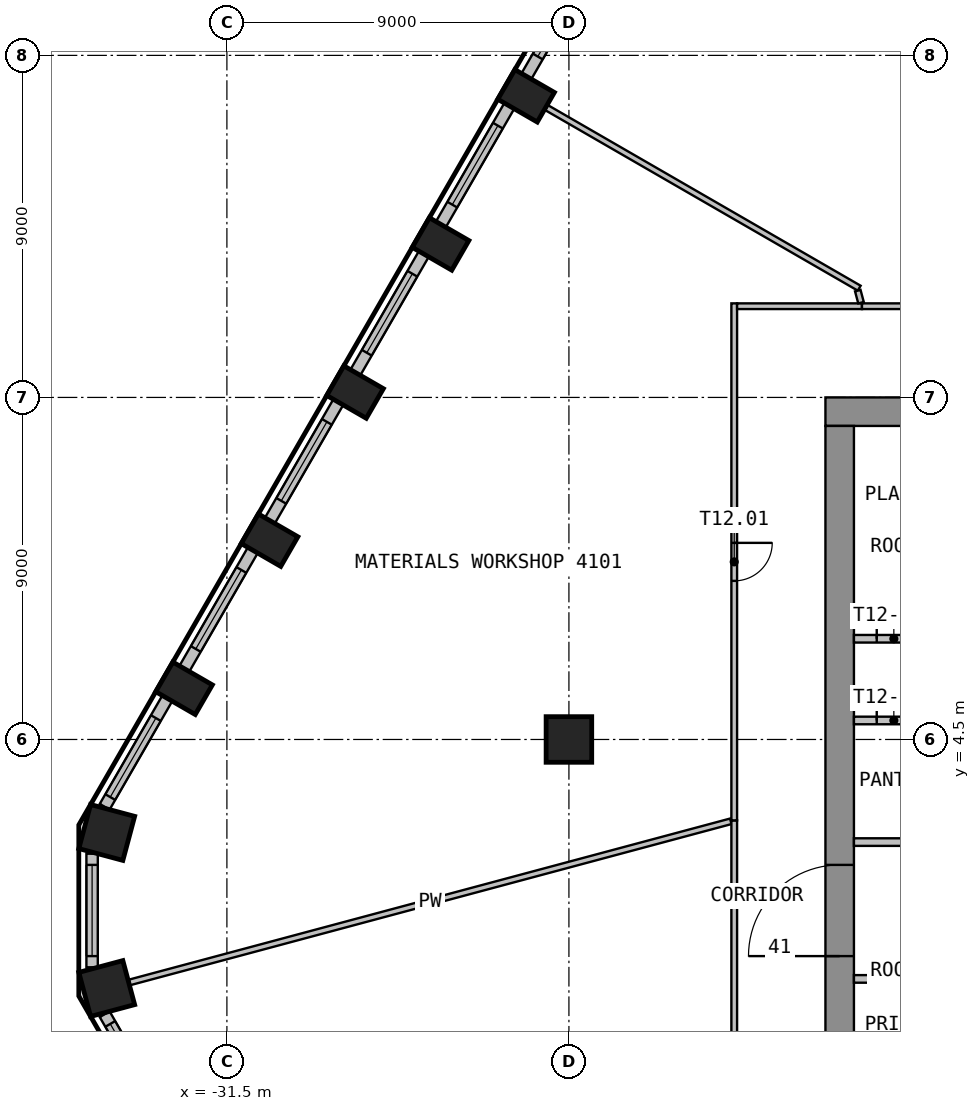
"""IFC4 building model, lengths in metres.
Left out: names, types, materials, properties, quantities, classifications, styles, units other than length and angle.
Written with IfcOpenShell. Run it as: python <this file> out.ifc"""

import sys

from ifc_helpers import new_model, si_unit, direction, frame, frame_2d, origin, origin_2d, place, context, subcontext, project, spatial, rectangle, circle, extrude, element, fill, save


model = new_model("IFC4")
c1 = context("Model", 3, precision=1e-05, world=origin(), true_north=direction((0.0, 1.0)))
c2 = subcontext(c1, "Body", "Model", "MODEL_VIEW")
j1 = project(units=[si_unit("LENGTHUNIT", "METRE"), si_unit("PLANEANGLEUNIT", "RADIAN")], contexts=[c1])
p1 = place(None, origin())
s1 = spatial("IfcSite", under=j1, at=p1, CompositionType="ELEMENT")
p2 = place(p1, origin())
s2 = spatial("IfcBuilding", under=s1, at=p2, CompositionType="ELEMENT")
p3 = place(p2, frame((0.0, 0.0, 167.7)))
s3 = spatial("IfcBuildingStorey", under=s2, at=p3, CompositionType="ELEMENT", Elevation=167.7)
for number, where, z_axis, x_axis in (
    (1, (-23.627, 21.436, 0.0), (0.0, 0.0, 1.0), (-0.5, -0.866, 0.0)),
    (2, (-25.877, 17.539, 0.0), (0.0, 0.0, 1.0), (-0.5, -0.866, 0.0)),
    (3, (-28.127, 13.641, 0.0), (0.0, 0.0, 1.0), (-0.5, -0.866, 0.0)),
    (4, (-30.377, 9.744, 0.0), (0.0, 0.0, 1.0), (-0.5, -0.866, 0.0)),
    (5, (-32.627, 5.847, 0.0), (0.0, 0.0, 1.0), (-0.5, -0.866, 0.0)),
):
    element("IfcColumn", number, at=place(p3, frame(where, z_axis=z_axis, x_axis=x_axis)), inside=s3, PredefinedType="COLUMN", context=c2, shape_type="SweptSolid", body=[
        extrude(rectangle(XDim=0.9, YDim=1.2, at=origin_2d()), origin(), (0.0, 0.0, 1.0), 3.575),
    ])
for number, where, z_axis, x_axis in (
    (6, (-34.662, 2.053, 0.0), (0.0, 0.0, 1.0), (-0.259, -0.966, 0.0)),
    (7, (-34.662, -2.053, 0.0), (0.0, 0.0, 1.0), (0.259, -0.966, 0.0)),
):
    element("IfcColumn", number, at=place(p3, frame(where, z_axis=z_axis, x_axis=x_axis)), inside=s3, PredefinedType="COLUMN", context=c2, shape_type="SweptSolid", body=[
        extrude(rectangle(XDim=1.2, YDim=1.2, at=origin_2d()), origin(), (0.0, 0.0, 1.0), 3.575),
    ])
p4 = place(p3, frame((-22.5, 4.5, 0.0), z_axis=(0.0, 0.0, 1.0), x_axis=(1.0, 0.0, 0.0)))
e8 = element("IfcColumn", 8, at=p4, inside=s3, PredefinedType="COLUMN", context=c2, shape_type="SweptSolid", body=[
    extrude(circle(Radius=0.6, at=origin_2d()), origin(), (0.0, 0.0, 1.0), 3.575),
])
p5 = place(p3, frame((-21.972, 24.803, 0.0), z_axis=(0.0, 0.0, 1.0), x_axis=(-0.500036802197, -0.866004154983, 0.0)))
e9 = element("IfcWall", 9, at=p5, inside=s3, PredefinedType="SOLIDWALL", context=c2, shape_type="SweptSolid", body=[
    extrude(rectangle(XDim=3.294, YDim=0.3, at=frame_2d((1.647, 0.0))), origin(), (0.0, 0.0, 1.0), 3.575),
])
p6 = place(p5, frame((0.294, 0.0, 0.9)))
e10 = element("IfcOpeningElement", 10, at=p6, cuts=e9, PredefinedType="OPENING", context=c2, shape_type="SweptSolid", body=[
    extrude(rectangle(XDim=2.4, YDim=2.1, at=frame_2d((1.2, 1.05))), frame((0.0, 0.16, 0.0), z_axis=(0.0, -1.0, 0.0), x_axis=(1.0, 0.0, 0.0)), (0.0, 0.0, 1.0), 0.32),
])
p7 = place(p3, frame((-24.069, 21.17, 0.0), z_axis=(0.0, 0.0, 1.0), x_axis=(-0.500027802648, -0.866009351323, 0.0)))
e11 = element("IfcWall", 11, at=p7, inside=s3, PredefinedType="SOLIDWALL", context=c2, shape_type="SweptSolid", body=[
    extrude(rectangle(XDim=3.599, YDim=0.3, at=frame_2d((1.799, 0.0))), origin(), (0.0, 0.0, 1.0), 3.575),
])
p8 = place(p7, frame((0.6, 0.0, 0.9)))
e12 = element("IfcOpeningElement", 12, at=p8, cuts=e11, PredefinedType="OPENING", context=c2, shape_type="SweptSolid", body=[
    extrude(rectangle(XDim=2.4, YDim=2.1, at=frame_2d((1.2, 1.05))), frame((0.0, 0.16, 0.0), z_axis=(0.0, -1.0, 0.0), x_axis=(1.0, 0.0, 0.0)), (0.0, 0.0, 1.0), 0.32),
])
p9 = place(p3, frame((-26.319, 17.273, 0.0), z_axis=(0.0, 0.0, 1.0), x_axis=(-0.500027802648, -0.866009351323, 0.0)))
e13 = element("IfcWall", 13, at=p9, inside=s3, PredefinedType="SOLIDWALL", context=c2, shape_type="SweptSolid", body=[
    extrude(rectangle(XDim=3.599, YDim=0.3, at=frame_2d((1.799, 0.0))), origin(), (0.0, 0.0, 1.0), 3.575),
])
p10 = place(p9, frame((0.6, 0.0, 0.9)))
e14 = element("IfcOpeningElement", 14, at=p10, cuts=e13, PredefinedType="OPENING", context=c2, shape_type="SweptSolid", body=[
    extrude(rectangle(XDim=2.4, YDim=2.1, at=frame_2d((1.2, 1.05))), frame((0.0, 0.16, 0.0), z_axis=(0.0, -1.0, 0.0), x_axis=(1.0, 0.0, 0.0)), (0.0, 0.0, 1.0), 0.32),
])
p11 = place(p3, frame((-28.569, 13.376, 0.0), z_axis=(0.0, 0.0, 1.0), x_axis=(-0.500027802648, -0.866009351323, 0.0)))
e15 = element("IfcWall", 15, at=p11, inside=s3, PredefinedType="SOLIDWALL", context=c2, shape_type="SweptSolid", body=[
    extrude(rectangle(XDim=3.599, YDim=0.3, at=frame_2d((1.799, 0.0))), origin(), (0.0, 0.0, 1.0), 3.575),
])
p12 = place(p11, frame((0.6, 0.0, 0.9)))
e16 = element("IfcOpeningElement", 16, at=p12, cuts=e15, PredefinedType="OPENING", context=c2, shape_type="SweptSolid", body=[
    extrude(rectangle(XDim=2.4, YDim=2.1, at=frame_2d((1.2, 1.05))), frame((0.0, 0.16, 0.0), z_axis=(0.0, -1.0, 0.0), x_axis=(1.0, 0.0, 0.0)), (0.0, 0.0, 1.0), 0.32),
])
p13 = place(p3, frame((-30.819, 9.479, 0.0), z_axis=(0.0, 0.0, 1.0), x_axis=(-0.500027802648, -0.866009351323, 0.0)))
e17 = element("IfcWall", 17, at=p13, inside=s3, PredefinedType="SOLIDWALL", context=c2, shape_type="SweptSolid", body=[
    extrude(rectangle(XDim=3.599, YDim=0.3, at=frame_2d((1.799, 0.0))), origin(), (0.0, 0.0, 1.0), 3.575),
])
p14 = place(p13, frame((0.6, 0.0, 0.9)))
e18 = element("IfcOpeningElement", 18, at=p14, cuts=e17, PredefinedType="OPENING", context=c2, shape_type="SweptSolid", body=[
    extrude(rectangle(XDim=2.4, YDim=2.1, at=frame_2d((1.2, 1.05))), frame((0.0, 0.16, 0.0), z_axis=(0.0, -1.0, 0.0), x_axis=(1.0, 0.0, 0.0)), (0.0, 0.0, 1.0), 0.32),
])
p15 = place(p3, frame((-33.069, 5.582, 0.0), z_axis=(0.0, 0.0, 1.0), x_axis=(-0.499981217486, -0.866036247602, 0.0)))
e19 = element("IfcWall", 19, at=p15, inside=s3, PredefinedType="SOLIDWALL", context=c2, shape_type="SweptSolid", body=[
    extrude(rectangle(XDim=3.294, YDim=0.3, at=frame_2d((1.647, 0.0))), origin(), (0.0, 0.0, 1.0), 3.575),
])
p16 = place(p15, frame((0.6, 0.0, 0.9)))
e20 = element("IfcOpeningElement", 20, at=p16, cuts=e19, PredefinedType="OPENING", context=c2, shape_type="SweptSolid", body=[
    extrude(rectangle(XDim=2.4, YDim=2.1, at=frame_2d((1.2, 1.05))), frame((0.0, 0.16, 0.0), z_axis=(0.0, -1.0, 0.0), x_axis=(1.0, 0.0, 0.0)), (0.0, 0.0, 1.0), 0.32),
])
p17 = place(p3, frame((-35.047, 1.495, 0.0), z_axis=(0.0, 0.0, 1.0), x_axis=(0.0, -1.0, 0.0)))
e21 = element("IfcWall", 21, at=p17, inside=s3, PredefinedType="SOLIDWALL", context=c2, shape_type="SweptSolid", body=[
    extrude(rectangle(XDim=2.989, YDim=0.3, at=frame_2d((1.495, 0.0))), origin(), (0.0, 0.0, 1.0), 3.575),
])
p18 = place(p17, frame((0.295, 0.0, 0.9)))
e22 = element("IfcOpeningElement", 22, at=p18, cuts=e21, PredefinedType="OPENING", context=c2, shape_type="SweptSolid", body=[
    extrude(rectangle(XDim=2.4, YDim=2.1, at=frame_2d((1.2, 1.05))), frame((0.0, 0.16, 0.0), z_axis=(0.0, -1.0, 0.0), x_axis=(1.0, 0.0, 0.0)), (0.0, 0.0, 1.0), 0.32),
])
p19 = place(p3, frame((-34.716, -2.729, 0.0), z_axis=(0.0, 0.0, 1.0), x_axis=(0.499981217486, -0.866036247602, 0.0)))
e23 = element("IfcWall", 23, at=p19, inside=s3, PredefinedType="SOLIDWALL", context=c2, shape_type="SweptSolid", body=[
    extrude(rectangle(XDim=3.294, YDim=0.3, at=frame_2d((1.647, 0.0))), origin(), (0.0, 0.0, 1.0), 3.575),
])
p20 = place(p19, frame((0.295, 0.0, 0.9)))
e24 = element("IfcOpeningElement", 24, at=p20, cuts=e23, PredefinedType="OPENING", context=c2, shape_type="SweptSolid", body=[
    extrude(rectangle(XDim=2.4, YDim=2.1, at=frame_2d((1.2, 1.05))), frame((0.0, 0.16, 0.0), z_axis=(0.0, -1.0, 0.0), x_axis=(1.0, 0.0, 0.0)), (0.0, 0.0, 1.0), 0.32),
])
p21 = place(p3, frame((-15.75, 13.125, 0.0), z_axis=(0.0, 0.0, 1.0), x_axis=(1.0, 0.0, 0.0)))
e25 = element("IfcWall", 25, at=p21, inside=s3, PredefinedType="SHEAR", context=c2, shape_type="SweptSolid", body=[
    extrude(rectangle(XDim=31.5, YDim=0.75, at=frame_2d((15.75, 0.0))), origin(), (0.0, 0.0, 1.0), 3.575),
])
p22 = place(p21, frame((14.55, 0.0, 0.0)))
e26 = element("IfcOpeningElement", 26, at=p22, cuts=e25, PredefinedType="OPENING", context=c2, shape_type="SweptSolid", body=[
    extrude(rectangle(XDim=2.4, YDim=2.1, at=frame_2d((1.2, 1.05))), frame((0.0, 0.385, 0.0), z_axis=(0.0, -1.0, 0.0), x_axis=(1.0, 0.0, 0.0)), (0.0, 0.0, 1.0), 0.77),
])
p23 = place(p21, frame((3.3, 0.0, 0.0)))
e27 = element("IfcOpeningElement", 27, at=p23, cuts=e25, PredefinedType="OPENING", context=c2, shape_type="SweptSolid", body=[
    extrude(rectangle(XDim=1.2, YDim=2.1, at=frame_2d((0.6, 1.05))), frame((0.0, 0.385, 0.0), z_axis=(0.0, -1.0, 0.0), x_axis=(1.0, 0.0, 0.0)), (0.0, 0.0, 1.0), 0.77),
])
p24 = place(p21, frame((27.0, 0.0, 0.0)))
e28 = element("IfcOpeningElement", 28, at=p24, cuts=e25, PredefinedType="OPENING", context=c2, shape_type="SweptSolid", body=[
    extrude(rectangle(XDim=1.2, YDim=2.1, at=frame_2d((0.6, 1.05))), frame((0.0, 0.385, 0.0), z_axis=(0.0, -1.0, 0.0), x_axis=(1.0, 0.0, 0.0)), (0.0, 0.0, 1.0), 0.77),
])
p25 = place(p3, frame((-15.375, -12.75, 0.0), z_axis=(0.0, 0.0, 1.0), x_axis=(0.0, 1.0, 0.0)))
e29 = element("IfcWall", 29, at=p25, inside=s3, PredefinedType="SHEAR", context=c2, shape_type="SweptSolid", body=[
    extrude(rectangle(XDim=25.5, YDim=0.75, at=frame_2d((12.75, 0.0))), origin(), (0.0, 0.0, 1.0), 3.575),
])
p26 = place(p25, frame((11.55, 0.0, 0.0)))
e30 = element("IfcOpeningElement", 30, at=p26, cuts=e29, PredefinedType="OPENING", context=c2, shape_type="SweptSolid", body=[
    extrude(rectangle(XDim=2.4, YDim=2.1, at=frame_2d((1.2, 1.05))), frame((0.0, 0.385, 0.0), z_axis=(0.0, -1.0, 0.0), x_axis=(1.0, 0.0, 0.0)), (0.0, 0.0, 1.0), 0.77),
])
p27 = place(p3, frame((-15.0, 7.15, 0.0), z_axis=(0.0, 0.0, 1.0), x_axis=(1.0, 0.0, 0.0)))
e31 = element("IfcWall", 31, at=p27, inside=s3, PredefinedType="PARTITIONING", context=c2, shape_type="SweptSolid", body=[
    extrude(rectangle(XDim=2.1, YDim=0.2, at=frame_2d((1.05, 0.0))), origin(), (0.0, 0.0, 1.0), 3.575),
])
p28 = place(p27, frame((0.6, 0.0, 0.0)))
e32 = element("IfcOpeningElement", 32, at=p28, cuts=e31, PredefinedType="OPENING", context=c2, shape_type="SweptSolid", body=[
    extrude(rectangle(XDim=0.9, YDim=2.1, at=frame_2d((0.45, 1.05))), frame((0.0, 0.11, 0.0), z_axis=(0.0, -1.0, 0.0), x_axis=(1.0, 0.0, 0.0)), (0.0, 0.0, 1.0), 0.22),
])
p29 = place(p3, frame((-15.0, 5.0, 0.0), z_axis=(0.0, 0.0, 1.0), x_axis=(1.0, 0.0, 0.0)))
e33 = element("IfcWall", 33, at=p29, inside=s3, PredefinedType="PARTITIONING", context=c2, shape_type="SweptSolid", body=[
    extrude(rectangle(XDim=2.1, YDim=0.2, at=frame_2d((1.05, 0.0))), origin(), (0.0, 0.0, 1.0), 3.575),
])
p30 = place(p29, frame((0.6, 0.0, 0.0)))
e34 = element("IfcOpeningElement", 34, at=p30, cuts=e33, PredefinedType="OPENING", context=c2, shape_type="SweptSolid", body=[
    extrude(rectangle(XDim=0.9, YDim=2.1, at=frame_2d((0.45, 1.05))), frame((0.0, 0.11, 0.0), z_axis=(0.0, -1.0, 0.0), x_axis=(1.0, 0.0, 0.0)), (0.0, 0.0, 1.0), 0.22),
])
for number, where, z_axis, x_axis in (
    (35, (-15.0, 1.8, 0.0), (0.0, 0.0, 1.0), (1.0, 0.0, 0.0)),
    (36, (-15.0, -1.8, 0.0), (0.0, 0.0, 1.0), (1.0, 0.0, 0.0)),
):
    element("IfcWall", number, at=place(p3, frame(where, z_axis=z_axis, x_axis=x_axis)), inside=s3, PredefinedType="PARTITIONING", context=c2, shape_type="SweptSolid", body=[
        extrude(rectangle(XDim=2.1, YDim=0.2, at=frame_2d((1.05, 0.0))), origin(), (0.0, 0.0, 1.0), 3.575),
    ])
p31 = place(p3, frame((-18.242, 2.346, 0.0), z_axis=(0.0, 0.0, 1.0), x_axis=(-0.965923767179, -0.258826729682, 0.0)))
e37 = element("IfcWall", 37, at=p31, inside=s3, PredefinedType="PARTITIONING", context=c2, shape_type="SweptSolid", body=[
    extrude(rectangle(XDim=16.38, YDim=0.15, at=frame_2d((8.19, 0.0))), origin(), (0.0, 0.0, 1.0), 3.575),
])
p32 = place(p3, frame((-23.09, 21.126, 0.0), z_axis=(0.0, 0.0, 1.0), x_axis=(0.866011447264, -0.500024172624, 0.0)))
e38 = element("IfcWall", 38, at=p32, inside=s3, PredefinedType="PARTITIONING", context=c2, shape_type="SweptSolid", body=[
    extrude(rectangle(XDim=9.502, YDim=0.15, at=frame_2d((4.751, 0.0))), origin(), (0.0, 0.0, 1.0), 3.575),
])
p33 = place(p3, frame((-18.15, 2.371, 0.0), z_axis=(0.0, 0.0, 1.0), x_axis=(0.0, -1.0, 0.0)))
e39 = element("IfcWall", 39, at=p33, inside=s3, PredefinedType="PARTITIONING", context=c2, shape_type="SweptSolid", body=[
    extrude(rectangle(XDim=18.346, YDim=0.15, at=frame_2d((9.173, 0.0))), origin(), (0.0, 0.0, 1.0), 3.575),
])
p34 = place(p33, frame((8.673, 0.0, 0.0)))
e40 = element("IfcOpeningElement", 40, at=p34, cuts=e39, PredefinedType="OPENING", context=c2, shape_type="SweptSolid", body=[
    extrude(rectangle(XDim=1.0, YDim=2.1, at=frame_2d((0.5, 1.05))), frame((0.0, 0.085, 0.0), z_axis=(0.0, -1.0, 0.0), x_axis=(1.0, 0.0, 0.0)), (0.0, 0.0, 1.0), 0.17),
])
p35 = place(p3, frame((-18.15, 15.975, 0.0), z_axis=(0.0, 0.0, 1.0), x_axis=(0.0, -1.0, 0.0)))
e41 = element("IfcWall", 41, at=p35, inside=s3, PredefinedType="PARTITIONING", context=c2, shape_type="SweptSolid", body=[
    extrude(rectangle(XDim=13.604, YDim=0.15, at=frame_2d((6.802, 0.0))), origin(), (0.0, 0.0, 1.0), 3.575),
])
p36 = place(p35, frame((6.302, 0.0, 0.0)))
e42 = element("IfcOpeningElement", 42, at=p36, cuts=e41, PredefinedType="OPENING", context=c2, shape_type="SweptSolid", body=[
    extrude(rectangle(XDim=1.0, YDim=2.1, at=frame_2d((0.5, 1.05))), frame((0.0, 0.085, 0.0), z_axis=(0.0, -1.0, 0.0), x_axis=(1.0, 0.0, 0.0)), (0.0, 0.0, 1.0), 0.17),
])
p37 = place(p3, frame((-14.789, 15.9, 0.0), z_axis=(0.0, 0.0, 1.0), x_axis=(-1.0, 0.0, 0.0)))
e43 = element("IfcWall", 43, at=p37, inside=s3, PredefinedType="PARTITIONING", context=c2, shape_type="SweptSolid", body=[
    extrude(rectangle(XDim=3.286, YDim=0.15, at=frame_2d((1.643, 0.0))), origin(), (0.0, 0.0, 1.0), 3.575),
])
p38 = place(p3, frame((-14.899, 16.311, 0.0), z_axis=(0.0, 0.0, 1.0), x_axis=(0.257478443243, -0.966284042746, 0.0)))
e44 = element("IfcWall", 44, at=p38, inside=s3, PredefinedType="PARTITIONING", context=c2, shape_type="SweptSolid", body=[
    extrude(rectangle(XDim=0.33, YDim=0.15, at=frame_2d((0.165, 0.0))), origin(), (0.0, 0.0, 1.0), 3.575),
])
p39 = place(p3, frame((-4.5, 15.9, 0.0), z_axis=(0.0, 0.0, 1.0), x_axis=(-1.0, 0.0, 0.0)))
e45 = element("IfcWall", 45, at=p39, inside=s3, PredefinedType="PARTITIONING", context=c2, shape_type="SweptSolid", body=[
    extrude(rectangle(XDim=10.289, YDim=0.15, at=frame_2d((5.145, 0.0))), origin(), (0.0, 0.0, 1.0), 3.575),
])
p40 = place(p39, frame((4.645, 0.0, 0.0)))
e46 = element("IfcOpeningElement", 46, at=p40, cuts=e45, PredefinedType="OPENING", context=c2, shape_type="SweptSolid", body=[
    extrude(rectangle(XDim=1.0, YDim=2.1, at=frame_2d((0.5, 1.05))), frame((0.0, 0.085, 0.0), z_axis=(0.0, -1.0, 0.0), x_axis=(1.0, 0.0, 0.0)), (0.0, 0.0, 1.0), 0.17),
])
p41 = place(p6, origin())
e47 = element("IfcWindow", 47, at=p41, inside=s3, PartitioningType="SINGLE_PANEL", PredefinedType="WINDOW", context=c2, shape_type="SweptSolid", body=[
    extrude(rectangle(XDim=2.4, YDim=2.1, at=frame_2d((1.2, 1.05))), frame((0.0, 0.03, 0.0), z_axis=(0.0, -1.0, 0.0), x_axis=(1.0, 0.0, 0.0)), (0.0, 0.0, 1.0), 0.06),
])
fill(e10, e47)
p42 = place(p8, origin())
e48 = element("IfcWindow", 48, at=p42, inside=s3, PartitioningType="SINGLE_PANEL", PredefinedType="WINDOW", context=c2, shape_type="SweptSolid", body=[
    extrude(rectangle(XDim=2.4, YDim=2.1, at=frame_2d((1.2, 1.05))), frame((0.0, 0.03, 0.0), z_axis=(0.0, -1.0, 0.0), x_axis=(1.0, 0.0, 0.0)), (0.0, 0.0, 1.0), 0.06),
])
fill(e12, e48)
p43 = place(p10, origin())
e49 = element("IfcWindow", 49, at=p43, inside=s3, PartitioningType="SINGLE_PANEL", PredefinedType="WINDOW", context=c2, shape_type="SweptSolid", body=[
    extrude(rectangle(XDim=2.4, YDim=2.1, at=frame_2d((1.2, 1.05))), frame((0.0, 0.03, 0.0), z_axis=(0.0, -1.0, 0.0), x_axis=(1.0, 0.0, 0.0)), (0.0, 0.0, 1.0), 0.06),
])
fill(e14, e49)
p44 = place(p12, origin())
e50 = element("IfcWindow", 50, at=p44, inside=s3, PartitioningType="SINGLE_PANEL", PredefinedType="WINDOW", context=c2, shape_type="SweptSolid", body=[
    extrude(rectangle(XDim=2.4, YDim=2.1, at=frame_2d((1.2, 1.05))), frame((0.0, 0.03, 0.0), z_axis=(0.0, -1.0, 0.0), x_axis=(1.0, 0.0, 0.0)), (0.0, 0.0, 1.0), 0.06),
])
fill(e16, e50)
p45 = place(p14, origin())
e51 = element("IfcWindow", 51, at=p45, inside=s3, PartitioningType="SINGLE_PANEL", PredefinedType="WINDOW", context=c2, shape_type="SweptSolid", body=[
    extrude(rectangle(XDim=2.4, YDim=2.1, at=frame_2d((1.2, 1.05))), frame((0.0, 0.03, 0.0), z_axis=(0.0, -1.0, 0.0), x_axis=(1.0, 0.0, 0.0)), (0.0, 0.0, 1.0), 0.06),
])
fill(e18, e51)
p46 = place(p16, origin())
e52 = element("IfcWindow", 52, at=p46, inside=s3, PartitioningType="SINGLE_PANEL", PredefinedType="WINDOW", context=c2, shape_type="SweptSolid", body=[
    extrude(rectangle(XDim=2.4, YDim=2.1, at=frame_2d((1.2, 1.05))), frame((0.0, 0.03, 0.0), z_axis=(0.0, -1.0, 0.0), x_axis=(1.0, 0.0, 0.0)), (0.0, 0.0, 1.0), 0.06),
])
fill(e20, e52)
p47 = place(p18, origin())
e53 = element("IfcWindow", 53, at=p47, inside=s3, PartitioningType="SINGLE_PANEL", PredefinedType="WINDOW", context=c2, shape_type="SweptSolid", body=[
    extrude(rectangle(XDim=2.4, YDim=2.1, at=frame_2d((1.2, 1.05))), frame((0.0, 0.03, 0.0), z_axis=(0.0, -1.0, 0.0), x_axis=(1.0, 0.0, 0.0)), (0.0, 0.0, 1.0), 0.06),
])
fill(e22, e53)
p48 = place(p20, origin())
e54 = element("IfcWindow", 54, at=p48, inside=s3, PartitioningType="SINGLE_PANEL", PredefinedType="WINDOW", context=c2, shape_type="SweptSolid", body=[
    extrude(rectangle(XDim=2.4, YDim=2.1, at=frame_2d((1.2, 1.05))), frame((0.0, 0.03, 0.0), z_axis=(0.0, -1.0, 0.0), x_axis=(1.0, 0.0, 0.0)), (0.0, 0.0, 1.0), 0.06),
])
fill(e24, e54)
p49 = place(p26, origin())
e55 = element("IfcDoor", 55, at=p49, inside=s3, OperationType="DOUBLE_DOOR_DOUBLE_SWING", PredefinedType="DOOR", context=c2, shape_type="SweptSolid", body=[
    extrude(rectangle(XDim=2.4, YDim=2.1, at=frame_2d((1.2, 1.05))), frame((0.0, 0.025, 0.0), z_axis=(0.0, -1.0, 0.0), x_axis=(1.0, 0.0, 0.0)), (0.0, 0.0, 1.0), 0.05),
])
fill(e30, e55)
p50 = place(p28, origin())
e56 = element("IfcDoor", 56, at=p50, inside=s3, OperationType="SINGLE_SWING_LEFT", PredefinedType="DOOR", context=c2, shape_type="SweptSolid", body=[
    extrude(rectangle(XDim=0.9, YDim=2.1, at=frame_2d((0.45, 1.05))), frame((0.0, 0.025, 0.0), z_axis=(0.0, -1.0, 0.0), x_axis=(1.0, 0.0, 0.0)), (0.0, 0.0, 1.0), 0.05),
])
fill(e32, e56)
p51 = place(p30, origin())
e57 = element("IfcDoor", 57, at=p51, inside=s3, OperationType="SINGLE_SWING_LEFT", PredefinedType="DOOR", context=c2, shape_type="SweptSolid", body=[
    extrude(rectangle(XDim=0.9, YDim=2.1, at=frame_2d((0.45, 1.05))), frame((0.0, 0.025, 0.0), z_axis=(0.0, -1.0, 0.0), x_axis=(1.0, 0.0, 0.0)), (0.0, 0.0, 1.0), 0.05),
])
fill(e34, e57)
p52 = place(p36, origin())
e58 = element("IfcDoor", 58, at=p52, inside=s3, OperationType="SINGLE_SWING_LEFT", PredefinedType="DOOR", context=c2, shape_type="SweptSolid", body=[
    extrude(rectangle(XDim=1.0, YDim=2.1, at=frame_2d((0.5, 1.05))), frame((0.0, 0.025, 0.0), z_axis=(0.0, -1.0, 0.0), x_axis=(1.0, 0.0, 0.0)), (0.0, 0.0, 1.0), 0.05),
])
fill(e42, e58)
save(model, sys.argv[1])
